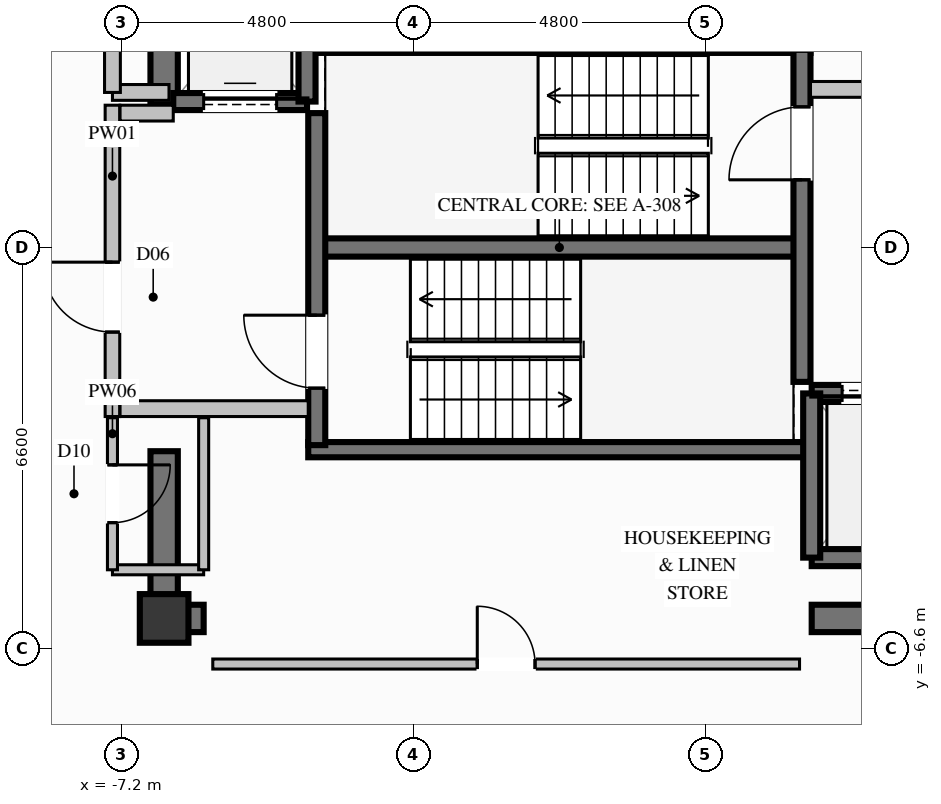
"""IFC4 building model, lengths in metres.
Left out: names, types, materials, properties, quantities, classifications, styles, units other than length and angle.
Written with IfcOpenShell. Run it as: python <this file> out.ifc"""

import sys

from ifc_helpers import new_model, si_unit, direction, frame, frame_2d, origin, origin_2d, place, context, subcontext, project, spatial, rectangle, extrude, element, fill, save


model = new_model("IFC4")
c1 = context("Model", 3, precision=1e-05, world=origin(), true_north=direction((0.0, 1.0)))
c2 = subcontext(c1, "Body", "Model", "MODEL_VIEW")
j1 = project(units=[si_unit("LENGTHUNIT", "METRE"), si_unit("PLANEANGLEUNIT", "RADIAN")], contexts=[c1])
p1 = place(None, origin())
s1 = spatial("IfcSite", under=j1, at=p1, CompositionType="ELEMENT")
p2 = place(p1, origin())
s2 = spatial("IfcBuilding", under=s1, at=p2, CompositionType="ELEMENT")
p3 = place(p2, frame((0.0, 0.0, 246.8)))
s3 = spatial("IfcBuildingStorey", under=s2, at=p3, CompositionType="ELEMENT", Elevation=246.8)
p4 = place(p3, frame((-6.5, -6.1, 0.0), z_axis=(0.0, 0.0, 1.0), x_axis=(1.0, 0.0, 0.0)))
e1 = element("IfcColumn", 1, at=p4, inside=s3, PredefinedType="COLUMN", context=c2, shape_type="SweptSolid", body=[
    extrude(rectangle(XDim=0.8, YDim=0.8, at=origin_2d()), origin(), (0.0, 0.0, 1.0), 3.8),
])
p5 = place(p3, frame((-3.99, 0.0, 0.0), z_axis=(0.0, 0.0, 1.0), x_axis=(1.0, 0.0, 0.0)))
e2 = element("IfcWall", 2, at=p5, inside=s3, PredefinedType="SHEAR", context=c2, shape_type="SweptSolid", body=[
    extrude(rectangle(XDim=7.98, YDim=0.3, at=frame_2d((3.99, 0.0))), origin(), (0.0, 0.0, 1.0), 3.8),
])
for number, where, z_axis, x_axis in (
    (3, (-4.13, -3.325, 0.0), (0.0, 0.0, 1.0), (1.0, 0.0, 0.0)),
    (4, (-4.13, 3.325, 0.0), (0.0, 0.0, 1.0), (1.0, 0.0, 0.0)),
):
    element("IfcWall", number, at=place(p3, frame(where, z_axis=z_axis, x_axis=x_axis)), inside=s3, PredefinedType="SOLIDWALL", context=c2, shape_type="SweptSolid", body=[
        extrude(rectangle(XDim=8.26, YDim=0.25, at=frame_2d((4.13, 0.0))), origin(), (0.0, 0.0, 1.0), 3.8),
    ])
p6 = place(p3, frame((-6.275, -6.1, 0.0), z_axis=(0.0, 0.0, 1.0), x_axis=(1.0, 0.0, 0.0)))
e5 = element("IfcWall", 5, at=p6, inside=s3, PredefinedType="SHEAR", context=c2, shape_type="SweptSolid", body=[
    extrude(rectangle(XDim=0.425, YDim=0.45, at=frame_2d((0.212, 0.0))), origin(), (0.0, 0.0, 1.0), 3.8),
])
p7 = place(p3, frame((4.15, -6.1, 0.0), z_axis=(0.0, 0.0, 1.0), x_axis=(1.0, 0.0, 0.0)))
e6 = element("IfcWall", 6, at=p7, inside=s3, PredefinedType="SHEAR", context=c2, shape_type="SweptSolid", body=[
    extrude(rectangle(XDim=2.125, YDim=0.45, at=frame_2d((1.062, 0.0))), origin(), (0.0, 0.0, 1.0), 3.8),
])
p8 = place(p3, frame((-6.5, 2.35, 0.0), z_axis=(0.0, 0.0, 1.0), x_axis=(0.0, 1.0, 0.0)))
e7 = element("IfcWall", 7, at=p8, inside=s3, PredefinedType="SHEAR", context=c2, shape_type="SweptSolid", body=[
    extrude(rectangle(XDim=3.975, YDim=0.45, at=frame_2d((1.987, 0.0))), origin(), (0.0, 0.0, 1.0), 3.8),
])
p9 = place(p3, frame((-6.5, -6.325, 0.0), z_axis=(0.0, 0.0, 1.0), x_axis=(0.0, 1.0, 0.0)))
e8 = element("IfcWall", 8, at=p9, inside=s3, PredefinedType="SHEAR", context=c2, shape_type="SweptSolid", body=[
    extrude(rectangle(XDim=2.975, YDim=0.45, at=frame_2d((1.487, 0.0))), origin(), (0.0, 0.0, 1.0), 3.8),
])
p10 = place(p3, frame((-6.35, 2.4, 0.0), z_axis=(0.0, 0.0, 1.0), x_axis=(1.0, 0.0, 0.0)))
e9 = element("IfcWall", 9, at=p10, inside=s3, PredefinedType="SOLIDWALL", context=c2, shape_type="SweptSolid", body=[
    extrude(rectangle(XDim=2.2, YDim=0.28, at=frame_2d((1.1, 0.0))), origin(), (0.0, 0.0, 1.0), 3.57),
])
p11 = place(p10, frame((0.5, 0.0, 0.0)))
e10 = element("IfcOpeningElement", 10, at=p11, cuts=e9, PredefinedType="OPENING", context=c2, shape_type="SweptSolid", body=[
    extrude(rectangle(XDim=1.2, YDim=2.2, at=frame_2d((0.6, 1.1))), frame((0.0, 0.15, 0.0), z_axis=(0.0, -1.0, 0.0), x_axis=(1.0, 0.0, 0.0)), (0.0, 0.0, 1.0), 0.3),
])
p12 = place(p3, frame((-4.15, 2.4, 0.0), z_axis=(0.0, 0.0, 1.0), x_axis=(0.0, 1.0, 0.0)))
e11 = element("IfcWall", 11, at=p12, inside=s3, PredefinedType="SOLIDWALL", context=c2, shape_type="SweptSolid", body=[
    extrude(rectangle(XDim=2.7, YDim=0.28, at=frame_2d((1.35, 0.0))), origin(), (0.0, 0.0, 1.0), 3.57),
])
p13 = place(p3, frame((4.15, -5.1, 0.0), z_axis=(0.0, 0.0, 1.0), x_axis=(1.0, 0.0, 0.0)))
e12 = element("IfcWall", 12, at=p13, inside=s3, PredefinedType="SOLIDWALL", context=c2, shape_type="SweptSolid", body=[
    extrude(rectangle(XDim=2.2, YDim=0.28, at=frame_2d((1.1, 0.0))), origin(), (0.0, 0.0, 1.0), 3.57),
])
p14 = place(p3, frame((6.35, -2.4, 0.0), z_axis=(0.0, 0.0, 1.0), x_axis=(-1.0, 0.0, 0.0)))
e13 = element("IfcWall", 13, at=p14, inside=s3, PredefinedType="SOLIDWALL", context=c2, shape_type="SweptSolid", body=[
    extrude(rectangle(XDim=2.2, YDim=0.28, at=frame_2d((1.1, 0.0))), origin(), (0.0, 0.0, 1.0), 3.57),
])
p15 = place(p14, frame((0.5, 0.0, 0.0)))
e14 = element("IfcOpeningElement", 14, at=p15, cuts=e13, PredefinedType="OPENING", context=c2, shape_type="SweptSolid", body=[
    extrude(rectangle(XDim=1.2, YDim=2.2, at=frame_2d((0.6, 1.1))), frame((0.0, 0.15, 0.0), z_axis=(0.0, -1.0, 0.0), x_axis=(1.0, 0.0, 0.0)), (0.0, 0.0, 1.0), 0.3),
])
p16 = place(p3, frame((4.15, -2.4, 0.0), z_axis=(0.0, 0.0, 1.0), x_axis=(0.0, -1.0, 0.0)))
e15 = element("IfcWall", 15, at=p16, inside=s3, PredefinedType="SOLIDWALL", context=c2, shape_type="SweptSolid", body=[
    extrude(rectangle(XDim=2.7, YDim=0.28, at=frame_2d((1.35, 0.0))), origin(), (0.0, 0.0, 1.0), 3.57),
])
p17 = place(p3, frame((-3.99, -3.25, 0.0), z_axis=(0.0, 0.0, 1.0), x_axis=(0.0, 1.0, 0.0)))
e16 = element("IfcWall", 16, at=p17, inside=s3, PredefinedType="SOLIDWALL", context=c2, shape_type="SweptSolid", body=[
    extrude(rectangle(XDim=5.46, YDim=0.28, at=frame_2d((2.73, 0.0))), origin(), (0.0, 0.0, 1.0), 3.57),
])
p18 = place(p17, frame((0.937, 0.0, 0.0)))
e17 = element("IfcOpeningElement", 17, at=p18, cuts=e16, PredefinedType="OPENING", context=c2, shape_type="SweptSolid", body=[
    extrude(rectangle(XDim=1.2, YDim=2.2, at=frame_2d((0.6, 1.1))), frame((0.0, 0.15, 0.0), z_axis=(0.0, -1.0, 0.0), x_axis=(1.0, 0.0, 0.0)), (0.0, 0.0, 1.0), 0.3),
])
p19 = place(p3, frame((3.99, -2.21, 0.0), z_axis=(0.0, 0.0, 1.0), x_axis=(0.0, 1.0, 0.0)))
e18 = element("IfcWall", 18, at=p19, inside=s3, PredefinedType="SOLIDWALL", context=c2, shape_type="SweptSolid", body=[
    extrude(rectangle(XDim=5.46, YDim=0.28, at=frame_2d((2.73, 0.0))), origin(), (0.0, 0.0, 1.0), 3.57),
])
p20 = place(p19, frame((3.323, 0.0, 0.0)))
e19 = element("IfcOpeningElement", 19, at=p20, cuts=e18, PredefinedType="OPENING", context=c2, shape_type="SweptSolid", body=[
    extrude(rectangle(XDim=1.2, YDim=2.2, at=frame_2d((0.6, 1.1))), frame((0.0, 0.15, 0.0), z_axis=(0.0, -1.0, 0.0), x_axis=(1.0, 0.0, 0.0)), (0.0, 0.0, 1.0), 0.3),
])
p21 = place(p3, frame((-7.35, -2.78, 0.0), z_axis=(0.0, 0.0, 1.0), x_axis=(0.0, 1.0, 0.0)))
e20 = element("IfcWall", 20, at=p21, inside=s3, PredefinedType="PARTITIONING", context=c2, shape_type="SweptSolid", body=[
    extrude(rectangle(XDim=5.12, YDim=0.24, at=frame_2d((2.56, 0.0))), origin(), (0.0, 0.0, 1.0), 2.655),
])
p22 = place(p21, frame((1.389, 0.0, 0.0)))
e21 = element("IfcOpeningElement", 21, at=p22, cuts=e20, PredefinedType="OPENING", context=c2, shape_type="SweptSolid", body=[
    extrude(rectangle(XDim=1.15, YDim=2.2, at=frame_2d((0.575, 1.1))), frame((0.0, 0.13, 0.0), z_axis=(0.0, -1.0, 0.0), x_axis=(1.0, 0.0, 0.0)), (0.0, 0.0, 1.0), 0.26),
])
p23 = place(p3, frame((-7.225, -2.65, 0.0), z_axis=(0.0, 0.0, 1.0), x_axis=(1.0, 0.0, 0.0)))
e22 = element("IfcWall", 22, at=p23, inside=s3, PredefinedType="PARTITIONING", context=c2, shape_type="SweptSolid", body=[
    extrude(rectangle(XDim=3.095, YDim=0.26, at=frame_2d((1.548, 0.0))), origin(), (0.0, 0.0, 1.0), 3.57),
])
p24 = place(p3, frame((-7.225, 2.21, 0.0), z_axis=(0.0, 0.0, 1.0), x_axis=(1.0, 0.0, 0.0)))
e23 = element("IfcWall", 23, at=p24, inside=s3, PredefinedType="PARTITIONING", context=c2, shape_type="SweptSolid", body=[
    extrude(rectangle(XDim=0.875, YDim=0.26, at=frame_2d((0.438, 0.0))), origin(), (0.0, 0.0, 1.0), 3.57),
])
p25 = place(p3, frame((4.13, 2.6, 0.0), z_axis=(0.0, 0.0, 1.0), x_axis=(1.0, 0.0, 0.0)))
e24 = element("IfcWall", 24, at=p25, inside=s3, PredefinedType="PARTITIONING", context=c2, shape_type="SweptSolid", body=[
    extrude(rectangle(XDim=3.095, YDim=0.26, at=frame_2d((1.548, 0.0))), origin(), (0.0, 0.0, 1.0), 3.57),
])
p26 = place(p3, frame((-7.35, 2.55, 0.0), z_axis=(0.0, 0.0, 1.0), x_axis=(1.0, 0.0, 0.0)))
e25 = element("IfcWall", 25, at=p26, inside=s3, PredefinedType="PARTITIONING", context=c2, shape_type="SweptSolid", body=[
    extrude(rectangle(XDim=0.93, YDim=0.26, at=frame_2d((0.465, 0.0))), origin(), (0.0, 0.0, 1.0), 3.57),
])
p27 = place(p3, frame((-7.35, 2.55, 0.0), z_axis=(0.0, 0.0, 1.0), x_axis=(0.0, 1.0, 0.0)))
e26 = element("IfcWall", 26, at=p27, inside=s3, PredefinedType="PARTITIONING", context=c2, shape_type="SweptSolid", body=[
    extrude(rectangle(XDim=2.4, YDim=0.26, at=frame_2d((1.2, 0.0))), origin(), (0.0, 0.0, 1.0), 2.655),
])
p28 = place(p27, frame((0.775, 0.0, 0.0)))
e27 = element("IfcOpeningElement", 27, at=p28, cuts=e26, PredefinedType="OPENING", context=c2, shape_type="SweptSolid", body=[
    extrude(rectangle(XDim=0.85, YDim=2.05, at=frame_2d((0.425, 1.025))), frame((0.0, 0.14, 0.0), z_axis=(0.0, -1.0, 0.0), x_axis=(1.0, 0.0, 0.0)), (0.0, 0.0, 1.0), 0.28),
])
p29 = place(p3, frame((-7.35, -5.3, 0.0), z_axis=(0.0, 0.0, 1.0), x_axis=(1.0, 0.0, 0.0)))
e28 = element("IfcWall", 28, at=p29, inside=s3, PredefinedType="PARTITIONING", context=c2, shape_type="SweptSolid", body=[
    extrude(rectangle(XDim=1.5, YDim=0.165, at=frame_2d((0.75, 0.0))), origin(), (0.0, 0.0, 1.0), 2.655),
])
p30 = place(p3, frame((-5.85, -5.3, 0.0), z_axis=(0.0, 0.0, 1.0), x_axis=(0.0, 1.0, 0.0)))
e29 = element("IfcWall", 29, at=p30, inside=s3, PredefinedType="PARTITIONING", context=c2, shape_type="SweptSolid", body=[
    extrude(rectangle(XDim=2.5, YDim=0.165, at=frame_2d((1.25, 0.0))), origin(), (0.0, 0.0, 1.0), 2.655),
])
p31 = place(p3, frame((-7.35, -2.8, 0.0), z_axis=(0.0, 0.0, 1.0), x_axis=(0.0, -1.0, 0.0)))
e30 = element("IfcWall", 30, at=p31, inside=s3, PredefinedType="PARTITIONING", context=c2, shape_type="SweptSolid", body=[
    extrude(rectangle(XDim=2.5, YDim=0.165, at=frame_2d((1.25, 0.0))), origin(), (0.0, 0.0, 1.0), 3.57),
])
p32 = place(p31, frame((0.775, 0.0, 0.0)))
e31 = element("IfcOpeningElement", 31, at=p32, cuts=e30, PredefinedType="OPENING", context=c2, shape_type="SweptSolid", body=[
    extrude(rectangle(XDim=0.95, YDim=2.1, at=frame_2d((0.475, 1.05))), frame((0.0, 0.093, 0.0), z_axis=(0.0, -1.0, 0.0), x_axis=(1.0, 0.0, 0.0)), (0.0, 0.0, 1.0), 0.185),
])
p33 = place(p3, frame((-5.7, -6.85, 0.0), z_axis=(0.0, 0.0, 1.0), x_axis=(1.0, 0.0, 0.0)))
e32 = element("IfcWall", 32, at=p33, inside=s3, PredefinedType="PARTITIONING", context=c2, shape_type="SweptSolid", body=[
    extrude(rectangle(XDim=9.65, YDim=0.165, at=frame_2d((4.825, 0.0))), origin(), (0.0, 0.0, 1.0), 2.655),
])
p34 = place(p33, frame((4.35, 0.0, 0.0)))
e33 = element("IfcOpeningElement", 33, at=p34, cuts=e32, PredefinedType="OPENING", context=c2, shape_type="SweptSolid", body=[
    extrude(rectangle(XDim=0.95, YDim=2.1, at=frame_2d((0.475, 1.05))), frame((0.0, 0.093, 0.0), z_axis=(0.0, -1.0, 0.0), x_axis=(1.0, 0.0, 0.0)), (0.0, 0.0, 1.0), 0.185),
])
p35 = place(p11, origin())
e34 = element("IfcDoor", 34, at=p35, inside=s3, OperationType="SLIDING_TO_LEFT", PredefinedType="DOOR", context=c2, shape_type="SweptSolid", body=[
    extrude(rectangle(XDim=1.2, YDim=2.2, at=frame_2d((0.6, 1.1))), frame((0.0, 0.025, 0.0), z_axis=(0.0, -1.0, 0.0), x_axis=(1.0, 0.0, 0.0)), (0.0, 0.0, 1.0), 0.05),
])
fill(e10, e34)
p36 = place(p15, origin())
e35 = element("IfcDoor", 35, at=p36, inside=s3, OperationType="SLIDING_TO_LEFT", PredefinedType="DOOR", context=c2, shape_type="SweptSolid", body=[
    extrude(rectangle(XDim=1.2, YDim=2.2, at=frame_2d((0.6, 1.1))), frame((0.0, 0.025, 0.0), z_axis=(0.0, -1.0, 0.0), x_axis=(1.0, 0.0, 0.0)), (0.0, 0.0, 1.0), 0.05),
])
fill(e14, e35)
p37 = place(p18, origin())
e36 = element("IfcDoor", 36, at=p37, inside=s3, OperationType="SINGLE_SWING_RIGHT", PredefinedType="DOOR", context=c2, shape_type="SweptSolid", body=[
    extrude(rectangle(XDim=1.2, YDim=2.2, at=frame_2d((0.6, 1.1))), frame((0.0, 0.025, 0.0), z_axis=(0.0, -1.0, 0.0), x_axis=(1.0, 0.0, 0.0)), (0.0, 0.0, 1.0), 0.05),
])
fill(e17, e36)
p38 = place(p20, origin())
e37 = element("IfcDoor", 37, at=p38, inside=s3, OperationType="SINGLE_SWING_LEFT", PredefinedType="DOOR", context=c2, shape_type="SweptSolid", body=[
    extrude(rectangle(XDim=1.2, YDim=2.2, at=frame_2d((0.6, 1.1))), frame((0.0, 0.025, 0.0), z_axis=(0.0, -1.0, 0.0), x_axis=(1.0, 0.0, 0.0)), (0.0, 0.0, 1.0), 0.05),
])
fill(e19, e37)
p39 = place(p22, origin())
e38 = element("IfcDoor", 38, at=p39, inside=s3, OperationType="SINGLE_SWING_RIGHT", PredefinedType="DOOR", context=c2, shape_type="SweptSolid", body=[
    extrude(rectangle(XDim=1.15, YDim=2.2, at=frame_2d((0.575, 1.1))), frame((0.0, 0.025, 0.0), z_axis=(0.0, -1.0, 0.0), x_axis=(1.0, 0.0, 0.0)), (0.0, 0.0, 1.0), 0.05),
])
fill(e21, e38)
p40 = place(p32, origin())
e39 = element("IfcDoor", 39, at=p40, inside=s3, OperationType="SINGLE_SWING_LEFT", PredefinedType="DOOR", context=c2, shape_type="SweptSolid", body=[
    extrude(rectangle(XDim=0.95, YDim=2.1, at=frame_2d((0.475, 1.05))), frame((0.0, 0.025, 0.0), z_axis=(0.0, -1.0, 0.0), x_axis=(1.0, 0.0, 0.0)), (0.0, 0.0, 1.0), 0.05),
])
fill(e31, e39)
p41 = place(p34, origin())
e40 = element("IfcDoor", 40, at=p41, inside=s3, OperationType="SINGLE_SWING_LEFT", PredefinedType="DOOR", context=c2, shape_type="SweptSolid", body=[
    extrude(rectangle(XDim=0.95, YDim=2.1, at=frame_2d((0.475, 1.05))), frame((0.0, 0.025, 0.0), z_axis=(0.0, -1.0, 0.0), x_axis=(1.0, 0.0, 0.0)), (0.0, 0.0, 1.0), 0.05),
])
fill(e33, e40)
save(model, sys.argv[1])
